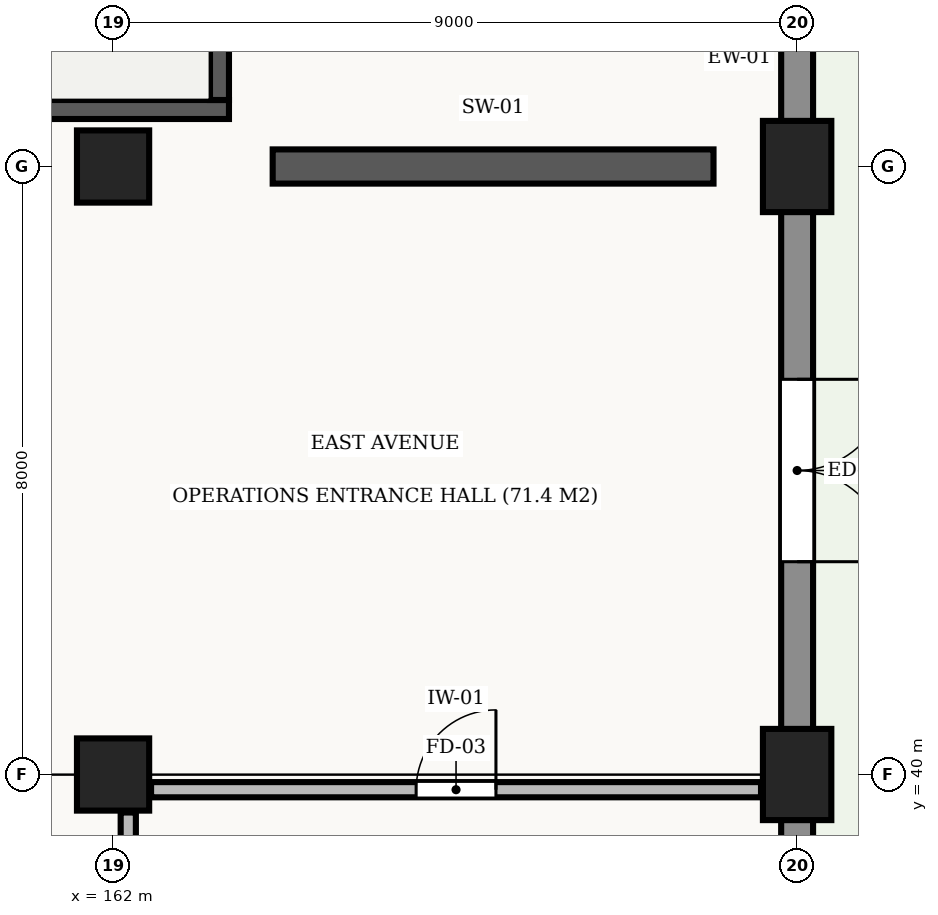
"""IFC4 building model, lengths in metres.
Left out: names, types, materials, properties, quantities, classifications, styles, units other than length and angle.
Written with IfcOpenShell. Run it as: python <this file> out.ifc"""

import sys

from ifc_helpers import new_model, si_unit, direction, frame, frame_2d, origin, origin_2d, place, context, subcontext, project, spatial, rectangle, extrude, element, fill, save


model = new_model("IFC4")
c1 = context("Model", 3, precision=1e-05, world=origin(), true_north=direction((0.0, 1.0)))
c2 = subcontext(c1, "Body", "Model", "MODEL_VIEW")
j1 = project(units=[si_unit("LENGTHUNIT", "METRE"), si_unit("PLANEANGLEUNIT", "RADIAN")], contexts=[c1])
p1 = place(None, origin())
s1 = spatial("IfcSite", under=j1, at=p1, CompositionType="ELEMENT")
p2 = place(p1, origin())
s2 = spatial("IfcBuilding", under=s1, at=p2, CompositionType="ELEMENT")
p3 = place(p2, origin())
s3 = spatial("IfcBuildingStorey", under=s2, at=p3, CompositionType="ELEMENT", Elevation=0.0)
for number, where, z_axis, x_axis in (
    (1, (162.0, 40.0, 0.0), (0.0, 0.0, 1.0), (1.0, 0.0, 0.0)),
    (2, (162.0, 48.0, 0.0), (0.0, 0.0, 1.0), (1.0, 0.0, 0.0)),
):
    element("IfcColumn", number, at=place(p3, frame(where, z_axis=z_axis, x_axis=x_axis)), inside=s3, PredefinedType="COLUMN", context=c2, shape_type="SweptSolid", body=[
        extrude(rectangle(XDim=0.95, YDim=0.95, at=origin_2d()), origin(), (0.0, 0.0, 1.0), 5.4),
    ])
for number, where, z_axis, x_axis in (
    (3, (171.0, 40.0, 0.0), (0.0, 0.0, 1.0), (1.0, 0.0, 0.0)),
    (4, (171.0, 48.0, 0.0), (0.0, 0.0, 1.0), (1.0, 0.0, 0.0)),
):
    element("IfcColumn", number, at=place(p3, frame(where, z_axis=z_axis, x_axis=x_axis)), inside=s3, PredefinedType="COLUMN", context=c2, shape_type="SweptSolid", body=[
        extrude(rectangle(XDim=0.9, YDim=1.2, at=origin_2d()), origin(), (0.0, 0.0, 1.0), 5.4),
    ])
p4 = place(p3, frame((171.0, 55.402, 0.0), z_axis=(0.0, 0.0, 1.0), x_axis=(0.0, -1.0, 0.0)))
e5 = element("IfcWall", 5, at=p4, inside=s3, PredefinedType="STANDARD", context=c2, shape_type="SweptSolid", body=[
    extrude(rectangle(XDim=6.804, YDim=0.42, at=frame_2d((3.402, 0.0))), origin(), (0.0, 0.0, 1.0), 4.38),
])
p5 = place(p4, frame((2.802, 0.0, 0.0)))
e6 = element("IfcOpeningElement", 6, at=p5, cuts=e5, PredefinedType="OPENING", context=c2, shape_type="SweptSolid", body=[
    extrude(rectangle(XDim=1.2, YDim=2.2, at=frame_2d((0.6, 1.1))), frame((0.0, 0.222, 0.0), z_axis=(0.0, -1.0, 0.0), x_axis=(1.0, 0.0, 0.0)), (0.0, 0.0, 1.0), 0.444),
])
p6 = place(p3, frame((171.0, 47.402, 0.0), z_axis=(0.0, 0.0, 1.0), x_axis=(0.0, -1.0, 0.0)))
e7 = element("IfcWall", 7, at=p6, inside=s3, PredefinedType="STANDARD", context=c2, shape_type="SweptSolid", body=[
    extrude(rectangle(XDim=6.804, YDim=0.42, at=frame_2d((3.402, 0.0))), origin(), (0.0, 0.0, 1.0), 4.38),
])
p7 = place(p6, frame((2.202, 0.0, 0.0)))
e8 = element("IfcOpeningElement", 8, at=p7, cuts=e7, PredefinedType="OPENING", context=c2, shape_type="SweptSolid", body=[
    extrude(rectangle(XDim=2.4, YDim=2.7, at=frame_2d((1.2, 1.35))), frame((0.0, 0.222, 0.0), z_axis=(0.0, -1.0, 0.0), x_axis=(1.0, 0.0, 0.0)), (0.0, 0.0, 1.0), 0.444),
])
p8 = place(p3, frame((171.0, 39.402, 0.0), z_axis=(0.0, 0.0, 1.0), x_axis=(0.0, -1.0, 0.0)))
e9 = element("IfcWall", 9, at=p8, inside=s3, PredefinedType="STANDARD", context=c2, shape_type="SweptSolid", body=[
    extrude(rectangle(XDim=6.804, YDim=0.42, at=frame_2d((3.402, 0.0))), origin(), (0.0, 0.0, 1.0), 4.38),
])
p9 = place(p8, frame((2.852, 0.0, 0.0)))
e10 = element("IfcOpeningElement", 10, at=p9, cuts=e9, PredefinedType="OPENING", context=c2, shape_type="SweptSolid", body=[
    extrude(rectangle(XDim=1.1, YDim=2.2, at=frame_2d((0.55, 1.1))), frame((0.0, 0.222, 0.0), z_axis=(0.0, -1.0, 0.0), x_axis=(1.0, 0.0, 0.0)), (0.0, 0.0, 1.0), 0.444),
])
p10 = place(p3, frame((153.875, 48.75, 0.0), z_axis=(0.0, 0.0, 1.0), x_axis=(1.0, 0.0, 0.0)))
e11 = element("IfcWall", 11, at=p10, inside=s3, PredefinedType="SHEAR", context=c2, shape_type="SweptSolid", body=[
    extrude(rectangle(XDim=9.65, YDim=0.25, at=frame_2d((4.825, 0.0))), origin(), (0.0, 0.0, 1.0), 5.05),
])
p11 = place(p3, frame((163.4, 48.875, 0.0), z_axis=(0.0, 0.0, 1.0), x_axis=(0.0, 1.0, 0.0)))
e12 = element("IfcWall", 12, at=p11, inside=s3, PredefinedType="SHEAR", context=c2, shape_type="SweptSolid", body=[
    extrude(rectangle(XDim=3.85, YDim=0.25, at=frame_2d((1.925, 0.0))), origin(), (0.0, 0.0, 1.0), 5.05),
])
p12 = place(p3, frame((164.1, 48.0, 0.0), z_axis=(0.0, 0.0, 1.0), x_axis=(1.0, 0.0, 0.0)))
e13 = element("IfcWall", 13, at=p12, inside=s3, PredefinedType="SHEAR", context=c2, shape_type="SweptSolid", body=[
    extrude(rectangle(XDim=5.8, YDim=0.45, at=frame_2d((2.9, 0.0))), origin(), (0.0, 0.0, 1.0), 4.1),
])
p13 = place(p3, frame((162.5, 39.8, 0.0), z_axis=(0.0, 0.0, 1.0), x_axis=(1.0, 0.0, 0.0)))
e14 = element("IfcWall", 14, at=p13, inside=s3, PredefinedType="STANDARD", context=c2, shape_type="SweptSolid", body=[
    extrude(rectangle(XDim=8.025, YDim=0.2, at=frame_2d((4.012, 0.0))), origin(), (0.0, 0.0, 1.0), 4.18),
])
p14 = place(p13, frame((3.488, 0.0, 0.0)))
e15 = element("IfcOpeningElement", 15, at=p14, cuts=e14, PredefinedType="OPENING", context=c2, shape_type="SweptSolid", body=[
    extrude(rectangle(XDim=1.05, YDim=2.15, at=frame_2d((0.525, 1.075))), frame((0.0, 0.112, 0.0), z_axis=(0.0, -1.0, 0.0), x_axis=(1.0, 0.0, 0.0)), (0.0, 0.0, 1.0), 0.224),
])
p15 = place(p3, frame((162.2, 32.5, 0.0), z_axis=(0.0, 0.0, 1.0), x_axis=(0.0, 1.0, 0.0)))
e16 = element("IfcWall", 16, at=p15, inside=s3, PredefinedType="STANDARD", context=c2, shape_type="SweptSolid", body=[
    extrude(rectangle(XDim=7.0, YDim=0.2, at=frame_2d((3.5, 0.0))), origin(), (0.0, 0.0, 1.0), 4.23),
])
p16 = place(p7, origin())
e17 = element("IfcDoor", 17, at=p16, inside=s3, OperationType="SINGLE_SWING_LEFT", PredefinedType="DOOR", context=c2, shape_type="SweptSolid", body=[
    extrude(rectangle(XDim=2.4, YDim=2.7, at=frame_2d((1.2, 1.35))), frame((0.0, 0.025, 0.0), z_axis=(0.0, -1.0, 0.0), x_axis=(1.0, 0.0, 0.0)), (0.0, 0.0, 1.0), 0.05),
])
fill(e8, e17)
p17 = place(p14, origin())
e18 = element("IfcDoor", 18, at=p17, inside=s3, OperationType="SINGLE_SWING_RIGHT", PredefinedType="DOOR", context=c2, shape_type="SweptSolid", body=[
    extrude(rectangle(XDim=1.05, YDim=2.15, at=frame_2d((0.525, 1.075))), frame((0.0, 0.025, 0.0), z_axis=(0.0, -1.0, 0.0), x_axis=(1.0, 0.0, 0.0)), (0.0, 0.0, 1.0), 0.05),
])
fill(e15, e18)
save(model, sys.argv[1])
